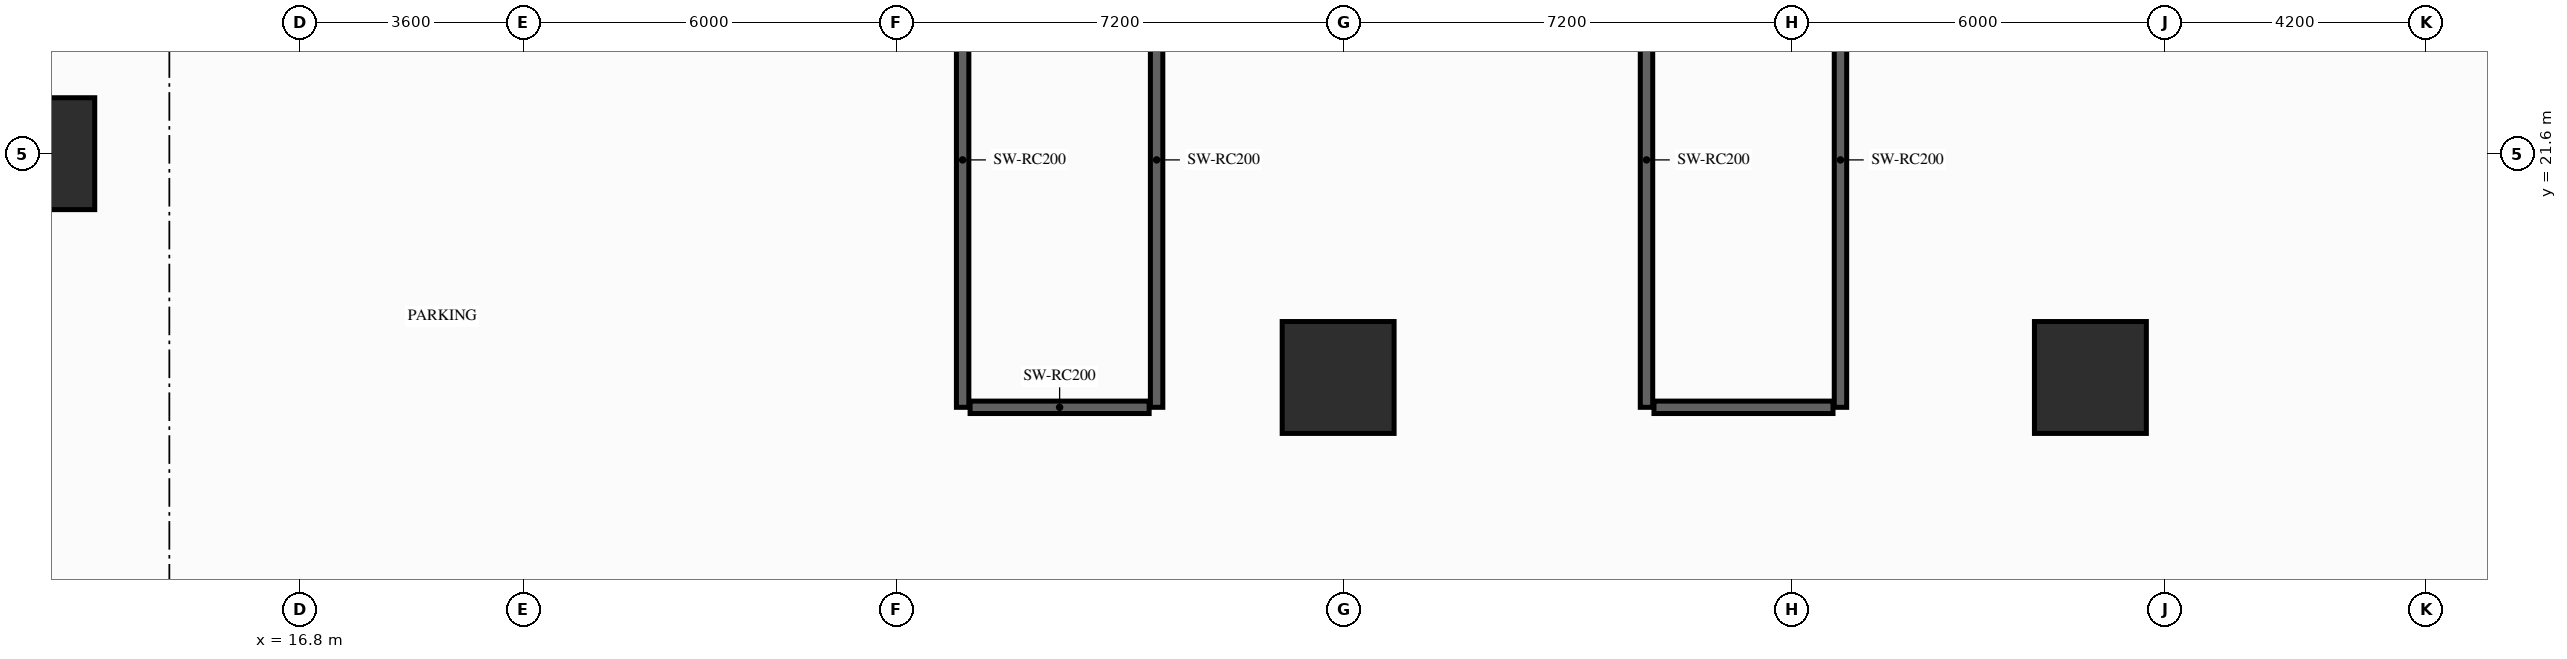
"""IFC4 building model, lengths in metres.
Left out: names, types, materials, properties, quantities, classifications, styles, units other than length and angle.
Written with IfcOpenShell. Run it as: python <this file> out.ifc"""

import sys

from ifc_helpers import new_model, si_unit, direction, frame, frame_2d, origin, origin_2d, place, context, subcontext, project, spatial, rectangle, extrude, element, save


model = new_model("IFC4")
c1 = context("Model", 3, precision=1e-05, world=origin(), true_north=direction((0.0, 1.0)))
c2 = subcontext(c1, "Body", "Model", "MODEL_VIEW")
j1 = project(units=[si_unit("LENGTHUNIT", "METRE"), si_unit("PLANEANGLEUNIT", "RADIAN")], contexts=[c1])
p1 = place(None, origin())
s1 = spatial("IfcSite", under=j1, at=p1, CompositionType="ELEMENT")
p2 = place(p1, origin())
s2 = spatial("IfcBuilding", under=s1, at=p2, CompositionType="ELEMENT")
p3 = place(p2, frame((0.0, 0.0, -3.8)))
s3 = spatial("IfcBuildingStorey", under=s2, at=p3, CompositionType="ELEMENT", Elevation=-3.8)
for number, where, z_axis, x_axis in (
    (1, (12.6, 21.6, 0.0), (0.0, 0.0, 1.0), (1.0, 0.0, 0.0)),
    (2, (33.5, 18.0, 0.0), (0.0, 0.0, 1.0), (1.0, 0.0, 0.0)),
    (3, (45.6, 18.0, 0.0), (0.0, 0.0, 1.0), (1.0, 0.0, 0.0)),
):
    element("IfcColumn", number, at=place(p3, frame(where, z_axis=z_axis, x_axis=x_axis)), inside=s3, PredefinedType="COLUMN", context=c2, shape_type="SweptSolid", body=[
        extrude(rectangle(XDim=1.8, YDim=1.8, at=origin_2d()), origin(), (0.0, 0.0, 1.0), 3.8),
    ])
for number, where, z_axis, x_axis in (
    (4, (27.46, 17.52, 0.0), (0.0, 0.0, 1.0), (0.0, 1.0, 0.0)),
    (5, (30.58, 17.52, 0.0), (0.0, 0.0, 1.0), (0.0, 1.0, 0.0)),
):
    element("IfcWall", number, at=place(p3, frame(where, z_axis=z_axis, x_axis=x_axis)), inside=s3, PredefinedType="SHEAR", context=c2, shape_type="SweptSolid", body=[
        extrude(rectangle(XDim=7.96, YDim=0.2, at=frame_2d((3.98, 0.0))), origin(), (0.0, 0.0, 1.0), 3.55),
    ])
p4 = place(p3, frame((27.58, 17.52, 0.0), z_axis=(0.0, 0.0, 1.0), x_axis=(1.0, 0.0, 0.0)))
e6 = element("IfcWall", 6, at=p4, inside=s3, PredefinedType="SHEAR", context=c2, shape_type="SweptSolid", body=[
    extrude(rectangle(XDim=2.88, YDim=0.2, at=frame_2d((1.44, 0.0))), origin(), (0.0, 0.0, 1.0), 3.55),
])
for number, where, z_axis, x_axis in (
    (7, (38.46, 17.52, 0.0), (0.0, 0.0, 1.0), (0.0, 1.0, 0.0)),
    (8, (41.58, 17.52, 0.0), (0.0, 0.0, 1.0), (0.0, 1.0, 0.0)),
):
    element("IfcWall", number, at=place(p3, frame(where, z_axis=z_axis, x_axis=x_axis)), inside=s3, PredefinedType="SHEAR", context=c2, shape_type="SweptSolid", body=[
        extrude(rectangle(XDim=7.96, YDim=0.2, at=frame_2d((3.98, 0.0))), origin(), (0.0, 0.0, 1.0), 3.55),
    ])
p5 = place(p3, frame((38.58, 17.52, 0.0), z_axis=(0.0, 0.0, 1.0), x_axis=(1.0, 0.0, 0.0)))
e9 = element("IfcWall", 9, at=p5, inside=s3, PredefinedType="SHEAR", context=c2, shape_type="SweptSolid", body=[
    extrude(rectangle(XDim=2.88, YDim=0.2, at=frame_2d((1.44, 0.0))), origin(), (0.0, 0.0, 1.0), 3.55),
])
save(model, sys.argv[1])
